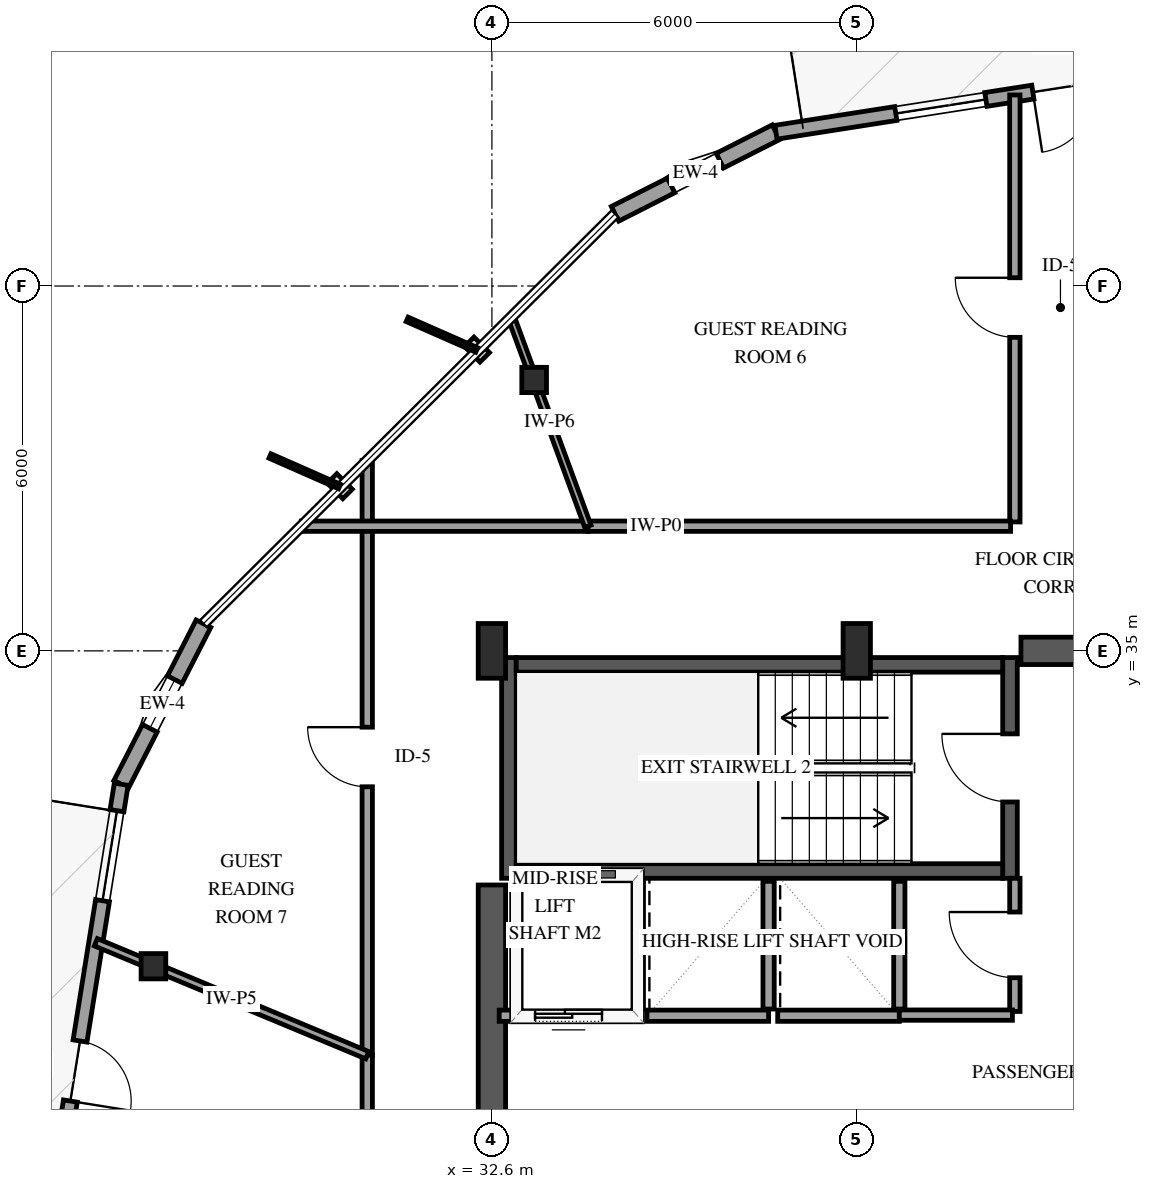
"""IFC4 building model, lengths in metres.
Left out: names, types, materials, properties, quantities, classifications, styles, units other than length and angle.
Written with IfcOpenShell. Run it as: python <this file> out.ifc"""

import sys

from ifc_helpers import new_model, si_unit, direction, frame, frame_2d, origin, origin_2d, place, context, subcontext, project, spatial, rectangle, i_section, extrude, element, fill, save


model = new_model("IFC4")
c1 = context("Model", 3, precision=1e-05, world=origin(), true_north=direction((0.0, 1.0)))
c2 = subcontext(c1, "Body", "Model", "MODEL_VIEW")
j1 = project(units=[si_unit("LENGTHUNIT", "METRE"), si_unit("PLANEANGLEUNIT", "RADIAN")], contexts=[c1])
p1 = place(None, origin())
s1 = spatial("IfcSite", under=j1, at=p1, CompositionType="ELEMENT")
p2 = place(p1, origin())
s2 = spatial("IfcBuilding", under=s1, at=p2, CompositionType="ELEMENT")
p3 = place(p2, frame((0.0, 0.0, 197.8)))
s3 = spatial("IfcBuildingStorey", under=s2, at=p3, CompositionType="ELEMENT", Elevation=197.8)
p4 = place(p3, frame((32.88, 31.26, 0.0), z_axis=(0.0, 0.0, 1.0), x_axis=(0.0, 1.0, 0.0)))
e1 = element("IfcWall", 1, at=p4, inside=s3, PredefinedType="SHEAR", context=c2, shape_type="SweptSolid", body=[
    extrude(rectangle(XDim=3.63, YDim=0.24, at=frame_2d((1.815, 0.0))), origin(), (0.0, 0.0, 1.0), 3.6),
])
p5 = place(p3, frame((41.12, 31.26, 0.0), z_axis=(0.0, 0.0, 1.0), x_axis=(0.0, 1.0, 0.0)))
e2 = element("IfcWall", 2, at=p5, inside=s3, PredefinedType="SHEAR", context=c2, shape_type="SweptSolid", body=[
    extrude(rectangle(XDim=3.63, YDim=0.24, at=frame_2d((1.815, 0.0))), origin(), (0.0, 0.0, 1.0), 3.6),
])
p6 = place(p5, frame((1.255, 0.0, 0.0)))
e3 = element("IfcOpeningElement", 3, at=p6, cuts=e2, PredefinedType="OPENING", context=c2, shape_type="SweptSolid", body=[
    extrude(rectangle(XDim=1.12, YDim=2.15, at=frame_2d((0.56, 1.075))), frame((0.0, 0.13, 0.0), z_axis=(0.0, -1.0, 0.0), x_axis=(1.0, 0.0, 0.0)), (0.0, 0.0, 1.0), 0.26),
])
for number, where, z_axis, x_axis in (
    (4, (33.0, 31.38, 0.0), (0.0, 0.0, 1.0), (1.0, 0.0, 0.0)),
    (5, (33.0, 34.77, 0.0), (0.0, 0.0, 1.0), (1.0, 0.0, 0.0)),
):
    element("IfcWall", number, at=place(p3, frame(where, z_axis=z_axis, x_axis=x_axis)), inside=s3, PredefinedType="SHEAR", context=c2, shape_type="SweptSolid", body=[
        extrude(rectangle(XDim=8.0, YDim=0.24, at=frame_2d((4.0, 0.0))), origin(), (0.0, 0.0, 1.0), 3.6),
    ])
p7 = place(p3, frame((32.6, 18.85, 0.0), z_axis=(0.0, 0.0, 1.0), x_axis=(0.0, 1.0, 0.0)))
e6 = element("IfcWall", 6, at=p7, inside=s3, PredefinedType="SHEAR", context=c2, shape_type="SweptSolid", body=[
    extrude(rectangle(XDim=12.3, YDim=0.45, at=frame_2d((6.15, 0.0))), origin(), (0.0, 0.0, 1.0), 3.6),
])
p8 = place(p3, frame((41.3, 35.0, 0.0), z_axis=(0.0, 0.0, 1.0), x_axis=(1.0, 0.0, 0.0)))
e7 = element("IfcWall", 7, at=p8, inside=s3, PredefinedType="SHEAR", context=c2, shape_type="SweptSolid", body=[
    extrude(rectangle(XDim=2.85, YDim=0.45, at=frame_2d((1.425, 0.0))), origin(), (0.0, 0.0, 1.0), 3.6),
])
for number, where, z_axis, x_axis in (
    (8, (32.6, 35.0, 0.0), (0.0, 0.0, 1.0), (1.0, 0.0, 0.0)),
    (9, (38.6, 35.0, 0.0), (0.0, 0.0, 1.0), (1.0, 0.0, 0.0)),
):
    element("IfcColumn", number, at=place(p3, frame(where, z_axis=z_axis, x_axis=x_axis)), inside=s3, PredefinedType="PILASTER", context=c2, shape_type="SweptSolid", body=[
        extrude(rectangle(XDim=0.45, YDim=0.9, at=origin_2d()), origin(), (0.0, 0.0, 1.0), 3.6),
    ])
for number, where, z_axis, x_axis in (
    (10, (33.295, 39.455, 0.0), (0.0, 0.0, 1.0), (1.0, 0.0, 0.0)),
    (11, (27.034, 29.814, 0.0), (0.0, 0.0, 1.0), (1.0, 0.0, 0.0)),
):
    element("IfcColumn", number, at=place(p3, frame(where, z_axis=z_axis, x_axis=x_axis)), inside=s3, PredefinedType="COLUMN", context=c2, shape_type="SweptSolid", body=[
        extrude(i_section(OverallWidth=0.406, OverallDepth=0.416, WebThickness=0.03, FlangeThickness=0.048, FilletRadius=0.038, at=origin_2d()), origin(), (0.0, 0.0, 1.0), 3.6),
    ])
p9 = place(p3, frame((37.271, 43.529, 0.0), z_axis=(0.0, 0.0, 1.0), x_axis=(-0.891944623655, -0.452144654213, 0.0)))
e12 = element("IfcWall", 12, at=p9, inside=s3, PredefinedType="SOLIDWALL", context=c2, shape_type="SweptSolid", body=[
    extrude(rectangle(XDim=2.967, YDim=0.27, at=frame_2d((1.483, 0.0))), origin(), (0.0, 0.0, 1.0), 2.679),
])
p10 = place(p9, frame((1.033, 0.0, 0.75)))
e13 = element("IfcOpeningElement", 13, at=p10, cuts=e12, PredefinedType="OPENING", context=c2, shape_type="SweptSolid", body=[
    extrude(rectangle(XDim=0.9, YDim=1.5, at=frame_2d((0.45, 0.75))), frame((0.0, 0.145, 0.0), z_axis=(0.0, -1.0, 0.0), x_axis=(1.0, 0.0, 0.0)), (0.0, 0.0, 1.0), 0.29),
])
p11 = place(p3, frame((46.709, 45.003, 0.0), z_axis=(0.0, 0.0, 1.0), x_axis=(-0.988013251918, -0.154369083801, 0.0)))
e14 = element("IfcWall", 14, at=p11, inside=s3, PredefinedType="SOLIDWALL", context=c2, shape_type="SweptSolid", body=[
    extrude(rectangle(XDim=9.552, YDim=0.23, at=frame_2d((4.776, 0.0))), origin(), (0.0, 0.0, 1.0), 2.679),
])
p12 = place(p11, frame((4.276, 0.0, 0.0)))
e15 = element("IfcOpeningElement", 15, at=p12, cuts=e14, PredefinedType="OPENING", context=c2, shape_type="SweptSolid", body=[
    extrude(rectangle(XDim=1.0, YDim=2.15, at=frame_2d((0.5, 1.075))), frame((0.0, 0.125, 0.0), z_axis=(0.0, -1.0, 0.0), x_axis=(1.0, 0.0, 0.0)), (0.0, 0.0, 1.0), 0.25),
])
p13 = place(p11, frame((0.44, 0.0, 0.72)))
e16 = element("IfcOpeningElement", 16, at=p13, cuts=e14, PredefinedType="OPENING", context=c2, shape_type="SweptSolid", body=[
    extrude(rectangle(XDim=1.5, YDim=1.7, at=frame_2d((0.75, 0.85))), frame((0.0, 0.125, 0.0), z_axis=(0.0, -1.0, 0.0), x_axis=(1.0, 0.0, 0.0)), (0.0, 0.0, 1.0), 0.25),
])
p14 = place(p11, frame((6.058, 0.0, 0.72)))
e17 = element("IfcOpeningElement", 17, at=p14, cuts=e14, PredefinedType="OPENING", context=c2, shape_type="SweptSolid", body=[
    extrude(rectangle(XDim=1.5, YDim=1.7, at=frame_2d((0.75, 0.85))), frame((0.0, 0.125, 0.0), z_axis=(0.0, -1.0, 0.0), x_axis=(1.0, 0.0, 0.0)), (0.0, 0.0, 1.0), 0.25),
])
p15 = place(p3, frame((27.856, 35.447, 0.0), z_axis=(0.0, 0.0, 1.0), x_axis=(-0.455850427724, -0.89005639571, 0.0)))
e18 = element("IfcWall", 18, at=p15, inside=s3, PredefinedType="SOLIDWALL", context=c2, shape_type="SweptSolid", body=[
    extrude(rectangle(XDim=2.967, YDim=0.27, at=frame_2d((1.483, 0.0))), origin(), (0.0, 0.0, 1.0), 2.679),
])
p16 = place(p15, frame((1.033, 0.0, 0.75)))
e19 = element("IfcOpeningElement", 19, at=p16, cuts=e18, PredefinedType="OPENING", context=c2, shape_type="SweptSolid", body=[
    extrude(rectangle(XDim=0.9, YDim=1.5, at=frame_2d((0.45, 0.75))), frame((0.0, 0.145, 0.0), z_axis=(0.0, -1.0, 0.0), x_axis=(1.0, 0.0, 0.0)), (0.0, 0.0, 1.0), 0.29),
])
p17 = place(p3, frame((26.504, 32.807, 0.0), z_axis=(0.0, 0.0, 1.0), x_axis=(-0.158485894053, -0.987361241586, 0.0)))
e20 = element("IfcWall", 20, at=p17, inside=s3, PredefinedType="SOLIDWALL", context=c2, shape_type="SweptSolid", body=[
    extrude(rectangle(XDim=9.552, YDim=0.23, at=frame_2d((4.776, 0.0))), origin(), (0.0, 0.0, 1.0), 2.679),
])
p18 = place(p17, frame((4.276, 0.0, 0.0)))
e21 = element("IfcOpeningElement", 21, at=p18, cuts=e20, PredefinedType="OPENING", context=c2, shape_type="SweptSolid", body=[
    extrude(rectangle(XDim=1.0, YDim=2.15, at=frame_2d((0.5, 1.075))), frame((0.0, 0.125, 0.0), z_axis=(0.0, -1.0, 0.0), x_axis=(1.0, 0.0, 0.0)), (0.0, 0.0, 1.0), 0.25),
])
p19 = place(p17, frame((0.44, 0.0, 0.72)))
e22 = element("IfcOpeningElement", 22, at=p19, cuts=e20, PredefinedType="OPENING", context=c2, shape_type="SweptSolid", body=[
    extrude(rectangle(XDim=1.5, YDim=1.7, at=frame_2d((0.75, 0.85))), frame((0.0, 0.125, 0.0), z_axis=(0.0, -1.0, 0.0), x_axis=(1.0, 0.0, 0.0)), (0.0, 0.0, 1.0), 0.25),
])
p20 = place(p17, frame((5.916, 0.0, 0.72)))
e23 = element("IfcOpeningElement", 23, at=p20, cuts=e20, PredefinedType="OPENING", context=c2, shape_type="SweptSolid", body=[
    extrude(rectangle(XDim=1.5, YDim=1.7, at=frame_2d((0.75, 0.85))), frame((0.0, 0.125, 0.0), z_axis=(0.0, -1.0, 0.0), x_axis=(1.0, 0.0, 0.0)), (0.0, 0.0, 1.0), 0.25),
])
p21 = place(p3, frame((32.72, 29.0, 0.0), z_axis=(0.0, 0.0, 1.0), x_axis=(1.0, 0.0, 0.0)))
e24 = element("IfcWall", 24, at=p21, inside=s3, PredefinedType="SOLIDWALL", context=c2, shape_type="SweptSolid", body=[
    extrude(rectangle(XDim=2.28, YDim=0.185, at=frame_2d((1.14, 0.0))), origin(), (0.0, 0.0, 1.0), 3.3),
])
p22 = place(p21, frame((0.59, 0.0, 0.0)))
e25 = element("IfcOpeningElement", 25, at=p22, cuts=e24, PredefinedType="OPENING", context=c2, shape_type="SweptSolid", body=[
    extrude(rectangle(XDim=1.1, YDim=2.15, at=frame_2d((0.55, 1.075))), frame((0.0, 0.103, 0.0), z_axis=(0.0, -1.0, 0.0), x_axis=(1.0, 0.0, 0.0)), (0.0, 0.0, 1.0), 0.205),
])
p23 = place(p3, frame((35.0, 29.11, 0.0), z_axis=(0.0, 0.0, 1.0), x_axis=(0.0, 1.0, 0.0)))
e26 = element("IfcWall", 26, at=p23, inside=s3, PredefinedType="SOLIDWALL", context=c2, shape_type="SweptSolid", body=[
    extrude(rectangle(XDim=2.1, YDim=0.185, at=frame_2d((1.05, 0.0))), origin(), (0.0, 0.0, 1.0), 3.3),
])
p24 = place(p3, frame((35.15, 29.0, 0.0), z_axis=(0.0, 0.0, 1.0), x_axis=(1.0, 0.0, 0.0)))
e27 = element("IfcWall", 27, at=p24, inside=s3, PredefinedType="SOLIDWALL", context=c2, shape_type="SweptSolid", body=[
    extrude(rectangle(XDim=2.0, YDim=0.185, at=frame_2d((1.0, 0.0))), origin(), (0.0, 0.0, 1.0), 3.3),
])
p25 = place(p3, frame((37.15, 29.11, 0.0), z_axis=(0.0, 0.0, 1.0), x_axis=(0.0, 1.0, 0.0)))
e28 = element("IfcWall", 28, at=p25, inside=s3, PredefinedType="SOLIDWALL", context=c2, shape_type="SweptSolid", body=[
    extrude(rectangle(XDim=2.1, YDim=0.185, at=frame_2d((1.05, 0.0))), origin(), (0.0, 0.0, 1.0), 3.3),
])
p26 = place(p3, frame((37.3, 29.0, 0.0), z_axis=(0.0, 0.0, 1.0), x_axis=(1.0, 0.0, 0.0)))
e29 = element("IfcWall", 29, at=p26, inside=s3, PredefinedType="SOLIDWALL", context=c2, shape_type="SweptSolid", body=[
    extrude(rectangle(XDim=2.0, YDim=0.185, at=frame_2d((1.0, 0.0))), origin(), (0.0, 0.0, 1.0), 3.3),
])
p27 = place(p3, frame((39.3, 29.11, 0.0), z_axis=(0.0, 0.0, 1.0), x_axis=(0.0, 1.0, 0.0)))
e30 = element("IfcWall", 30, at=p27, inside=s3, PredefinedType="SOLIDWALL", context=c2, shape_type="SweptSolid", body=[
    extrude(rectangle(XDim=2.1, YDim=0.185, at=frame_2d((1.05, 0.0))), origin(), (0.0, 0.0, 1.0), 3.3),
])
p28 = place(p3, frame((30.55, 28.351, 0.0), z_axis=(0.0, 0.0, 1.0), x_axis=(0.0, 1.0, 0.0)))
e31 = element("IfcWall", 31, at=p28, inside=s3, PredefinedType="PARTITIONING", context=c2, shape_type="SweptSolid", body=[
    extrude(rectangle(XDim=9.778, YDim=0.17, at=frame_2d((4.889, 0.0))), origin(), (0.0, 0.0, 1.0), 3.3),
])
p29 = place(p28, frame((4.414, 0.0, 0.0)))
e32 = element("IfcOpeningElement", 32, at=p29, cuts=e31, PredefinedType="OPENING", context=c2, shape_type="SweptSolid", body=[
    extrude(rectangle(XDim=0.98, YDim=2.15, at=frame_2d((0.49, 1.075))), frame((0.0, 0.095, 0.0), z_axis=(0.0, -1.0, 0.0), x_axis=(1.0, 0.0, 0.0)), (0.0, 0.0, 1.0), 0.19),
])
p30 = place(p3, frame((30.55, 20.106, 0.0), z_axis=(0.0, 0.0, 1.0), x_axis=(0.0, 1.0, 0.0)))
e33 = element("IfcWall", 33, at=p30, inside=s3, PredefinedType="PARTITIONING", context=c2, shape_type="SweptSolid", body=[
    extrude(rectangle(XDim=8.245, YDim=0.17, at=frame_2d((4.123, 0.0))), origin(), (0.0, 0.0, 1.0), 3.3),
])
p31 = place(p30, frame((3.647, 0.0, 0.0)))
e34 = element("IfcOpeningElement", 34, at=p31, cuts=e33, PredefinedType="OPENING", context=c2, shape_type="SweptSolid", body=[
    extrude(rectangle(XDim=0.98, YDim=2.15, at=frame_2d((0.49, 1.075))), frame((0.0, 0.095, 0.0), z_axis=(0.0, -1.0, 0.0), x_axis=(1.0, 0.0, 0.0)), (0.0, 0.0, 1.0), 0.19),
])
p32 = place(p3, frame((41.2, 37.12, 0.0), z_axis=(0.0, 0.0, 1.0), x_axis=(0.0, 1.0, 0.0)))
e35 = element("IfcWall", 35, at=p32, inside=s3, PredefinedType="PARTITIONING", context=c2, shape_type="SweptSolid", body=[
    extrude(rectangle(XDim=7.022, YDim=0.17, at=frame_2d((3.511, 0.0))), origin(), (0.0, 0.0, 1.0), 3.3),
])
p33 = place(p32, frame((3.036, 0.0, 0.0)))
e36 = element("IfcOpeningElement", 36, at=p33, cuts=e35, PredefinedType="OPENING", context=c2, shape_type="SweptSolid", body=[
    extrude(rectangle(XDim=0.98, YDim=2.15, at=frame_2d((0.49, 1.075))), frame((0.0, 0.095, 0.0), z_axis=(0.0, -1.0, 0.0), x_axis=(1.0, 0.0, 0.0)), (0.0, 0.0, 1.0), 0.19),
])
p34 = place(p3, frame((34.178, 37.05, 0.0), z_axis=(0.0, 0.0, 1.0), x_axis=(1.0, 0.0, 0.0)))
e37 = element("IfcWall", 37, at=p34, inside=s3, PredefinedType="PARTITIONING", context=c2, shape_type="SweptSolid", body=[
    extrude(rectangle(XDim=6.952, YDim=0.17, at=frame_2d((3.476, 0.0))), origin(), (0.0, 0.0, 1.0), 3.3),
])
p35 = place(p3, frame((30.55, 28.351, 0.0), z_axis=(0.0, 0.0, 1.0), x_axis=(-0.923275531176, 0.384138378104, 0.0)))
e38 = element("IfcWall", 38, at=p35, inside=s3, PredefinedType="PARTITIONING", context=c2, shape_type="SweptSolid", body=[
    extrude(rectangle(XDim=4.834, YDim=0.13, at=frame_2d((2.417, 0.0))), origin(), (0.0, 0.0, 1.0), 3.3),
])
p36 = place(p3, frame((29.466, 37.05, 0.0), z_axis=(0.0, 0.0, 1.0), x_axis=(1.0, 0.0, 0.0)))
e39 = element("IfcWall", 39, at=p36, inside=s3, PredefinedType="PARTITIONING", context=c2, shape_type="SweptSolid", body=[
    extrude(rectangle(XDim=4.712, YDim=0.17, at=frame_2d((2.356, 0.0))), origin(), (0.0, 0.0, 1.0), 3.3),
])
p37 = place(p3, frame((34.178, 37.05, 0.0), z_axis=(0.0, 0.0, 1.0), x_axis=(-0.344756296603, 0.938692226426, 0.0)))
e40 = element("IfcWall", 40, at=p37, inside=s3, PredefinedType="PARTITIONING", context=c2, shape_type="SweptSolid", body=[
    extrude(rectangle(XDim=3.66, YDim=0.11, at=frame_2d((1.83, 0.0))), origin(), (0.0, 0.0, 1.0), 2.595),
])
p38 = place(p3, frame((41.2, 29.07, 0.0), z_axis=(0.0, 0.0, 1.0), x_axis=(0.0, 1.0, 0.0)))
e41 = element("IfcWall", 41, at=p38, inside=s3, PredefinedType="PARTITIONING", context=c2, shape_type="SweptSolid", body=[
    extrude(rectangle(XDim=2.19, YDim=0.17, at=frame_2d((1.095, 0.0))), origin(), (0.0, 0.0, 1.0), 3.3),
])
p39 = place(p38, frame((0.555, 0.0, 0.0)))
e42 = element("IfcOpeningElement", 42, at=p39, cuts=e41, PredefinedType="OPENING", context=c2, shape_type="SweptSolid", body=[
    extrude(rectangle(XDim=1.08, YDim=2.15, at=frame_2d((0.54, 1.075))), frame((0.0, 0.095, 0.0), z_axis=(0.0, -1.0, 0.0), x_axis=(1.0, 0.0, 0.0)), (0.0, 0.0, 1.0), 0.19),
])
p40 = place(p3, frame((39.3, 29.01, 0.0), z_axis=(0.0, 0.0, 1.0), x_axis=(1.0, 0.0, 0.0)))
e43 = element("IfcWall", 43, at=p40, inside=s3, PredefinedType="PARTITIONING", context=c2, shape_type="SweptSolid", body=[
    extrude(rectangle(XDim=1.86, YDim=0.17, at=frame_2d((0.93, 0.0))), origin(), (0.0, 0.0, 1.0), 3.3),
])
p41 = place(p10, origin())
e44 = element("IfcWindow", 44, at=p41, inside=s3, PartitioningType="SINGLE_PANEL", PredefinedType="WINDOW", context=c2, shape_type="SweptSolid", body=[
    extrude(rectangle(XDim=0.9, YDim=1.5, at=frame_2d((0.45, 0.75))), frame((0.0, 0.03, 0.0), z_axis=(0.0, -1.0, 0.0), x_axis=(1.0, 0.0, 0.0)), (0.0, 0.0, 1.0), 0.06),
])
fill(e13, e44)
p42 = place(p12, origin())
e45 = element("IfcDoor", 45, at=p42, inside=s3, OperationType="SINGLE_SWING_RIGHT", PredefinedType="DOOR", context=c2, shape_type="SweptSolid", body=[
    extrude(rectangle(XDim=1.0, YDim=2.15, at=frame_2d((0.5, 1.075))), frame((0.0, 0.025, 0.0), z_axis=(0.0, -1.0, 0.0), x_axis=(1.0, 0.0, 0.0)), (0.0, 0.0, 1.0), 0.05),
])
fill(e15, e45)
p43 = place(p14, origin())
e46 = element("IfcWindow", 46, at=p43, inside=s3, PartitioningType="SINGLE_PANEL", PredefinedType="WINDOW", context=c2, shape_type="SweptSolid", body=[
    extrude(rectangle(XDim=1.5, YDim=1.7, at=frame_2d((0.75, 0.85))), frame((0.0, 0.03, 0.0), z_axis=(0.0, -1.0, 0.0), x_axis=(1.0, 0.0, 0.0)), (0.0, 0.0, 1.0), 0.06),
])
fill(e17, e46)
p44 = place(p16, origin())
e47 = element("IfcWindow", 47, at=p44, inside=s3, PartitioningType="SINGLE_PANEL", PredefinedType="WINDOW", context=c2, shape_type="SweptSolid", body=[
    extrude(rectangle(XDim=0.9, YDim=1.5, at=frame_2d((0.45, 0.75))), frame((0.0, 0.03, 0.0), z_axis=(0.0, -1.0, 0.0), x_axis=(1.0, 0.0, 0.0)), (0.0, 0.0, 1.0), 0.06),
])
fill(e19, e47)
p45 = place(p18, origin())
e48 = element("IfcDoor", 48, at=p45, inside=s3, OperationType="SINGLE_SWING_RIGHT", PredefinedType="DOOR", context=c2, shape_type="SweptSolid", body=[
    extrude(rectangle(XDim=1.0, YDim=2.15, at=frame_2d((0.5, 1.075))), frame((0.0, 0.025, 0.0), z_axis=(0.0, -1.0, 0.0), x_axis=(1.0, 0.0, 0.0)), (0.0, 0.0, 1.0), 0.05),
])
fill(e21, e48)
p46 = place(p19, origin())
e49 = element("IfcWindow", 49, at=p46, inside=s3, PartitioningType="SINGLE_PANEL", PredefinedType="WINDOW", context=c2, shape_type="SweptSolid", body=[
    extrude(rectangle(XDim=1.5, YDim=1.7, at=frame_2d((0.75, 0.85))), frame((0.0, 0.03, 0.0), z_axis=(0.0, -1.0, 0.0), x_axis=(1.0, 0.0, 0.0)), (0.0, 0.0, 1.0), 0.06),
])
fill(e22, e49)
p47 = place(p22, origin())
e50 = element("IfcDoor", 50, at=p47, inside=s3, OperationType="SLIDING_TO_LEFT", PredefinedType="DOOR", context=c2, shape_type="SweptSolid", body=[
    extrude(rectangle(XDim=1.1, YDim=2.15, at=frame_2d((0.55, 1.075))), frame((0.0, 0.025, 0.0), z_axis=(0.0, -1.0, 0.0), x_axis=(1.0, 0.0, 0.0)), (0.0, 0.0, 1.0), 0.05),
])
fill(e25, e50)
p48 = place(p6, origin())
e51 = element("IfcDoor", 51, at=p48, inside=s3, OperationType="SINGLE_SWING_RIGHT", PredefinedType="DOOR", context=c2, shape_type="SweptSolid", body=[
    extrude(rectangle(XDim=1.12, YDim=2.15, at=frame_2d((0.56, 1.075))), frame((0.0, 0.025, 0.0), z_axis=(0.0, -1.0, 0.0), x_axis=(1.0, 0.0, 0.0)), (0.0, 0.0, 1.0), 0.05),
])
fill(e3, e51)
p49 = place(p29, origin())
e52 = element("IfcDoor", 52, at=p49, inside=s3, OperationType="SINGLE_SWING_RIGHT", PredefinedType="DOOR", context=c2, shape_type="SweptSolid", body=[
    extrude(rectangle(XDim=0.98, YDim=2.15, at=frame_2d((0.49, 1.075))), frame((0.0, 0.025, 0.0), z_axis=(0.0, -1.0, 0.0), x_axis=(1.0, 0.0, 0.0)), (0.0, 0.0, 1.0), 0.05),
])
fill(e32, e52)
p50 = place(p33, origin())
e53 = element("IfcDoor", 53, at=p50, inside=s3, OperationType="SINGLE_SWING_RIGHT", PredefinedType="DOOR", context=c2, shape_type="SweptSolid", body=[
    extrude(rectangle(XDim=0.98, YDim=2.15, at=frame_2d((0.49, 1.075))), frame((0.0, 0.025, 0.0), z_axis=(0.0, -1.0, 0.0), x_axis=(1.0, 0.0, 0.0)), (0.0, 0.0, 1.0), 0.05),
])
fill(e36, e53)
p51 = place(p39, origin())
e54 = element("IfcDoor", 54, at=p51, inside=s3, OperationType="SINGLE_SWING_RIGHT", PredefinedType="DOOR", context=c2, shape_type="SweptSolid", body=[
    extrude(rectangle(XDim=1.08, YDim=2.15, at=frame_2d((0.54, 1.075))), frame((0.0, 0.025, 0.0), z_axis=(0.0, -1.0, 0.0), x_axis=(1.0, 0.0, 0.0)), (0.0, 0.0, 1.0), 0.05),
])
fill(e42, e54)
save(model, sys.argv[1])
